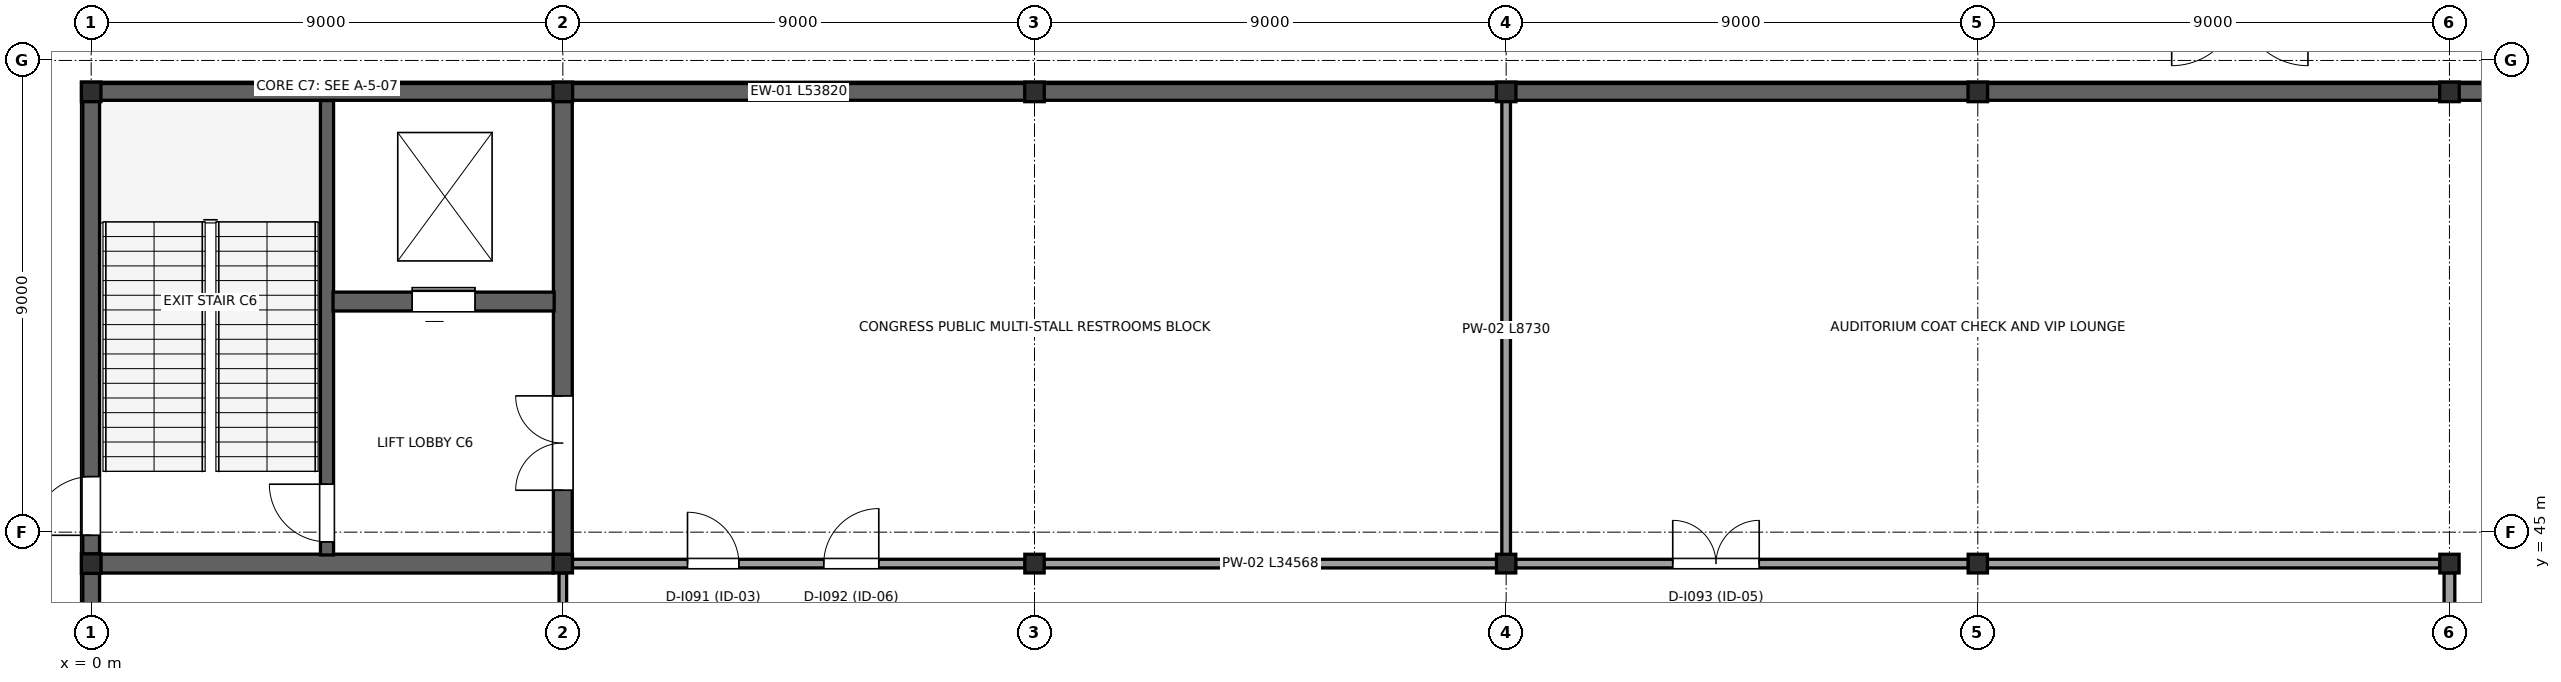
"""IFC4 building model, lengths in metres.
Left out: names, types, materials, properties, quantities, classifications, styles, units other than length and angle.
Written with IfcOpenShell. Run it as: python <this file> out.ifc"""

import sys

from ifc_helpers import new_model, si_unit, direction, frame, frame_2d, origin, origin_2d, place, context, subcontext, project, spatial, rectangle, i_section, extrude, element, fill, save


model = new_model("IFC4")
c1 = context("Model", 3, precision=1e-05, world=origin(), true_north=direction((0.0, 1.0)))
c2 = subcontext(c1, "Body", "Model", "MODEL_VIEW")
j1 = project(units=[si_unit("LENGTHUNIT", "METRE"), si_unit("PLANEANGLEUNIT", "RADIAN")], contexts=[c1])
p1 = place(None, origin())
s1 = spatial("IfcSite", under=j1, at=p1, CompositionType="ELEMENT")
p2 = place(p1, origin())
s2 = spatial("IfcBuilding", under=s1, at=p2, CompositionType="ELEMENT")
p3 = place(p2, origin())
s3 = spatial("IfcBuildingStorey", under=s2, at=p3, CompositionType="ELEMENT", Elevation=0.0)
for number, where, z_axis, x_axis in (
    (1, (45.0, 53.4, 0.0), (0.0, 0.0, 1.0), (1.0, 0.0, 0.0)),
    (2, (36.0, 53.4, 0.0), (0.0, 0.0, 1.0), (1.0, 0.0, 0.0)),
    (3, (27.0, 53.4, 0.0), (0.0, 0.0, 1.0), (1.0, 0.0, 0.0)),
    (4, (18.0, 53.4, 0.0), (0.0, 0.0, 1.0), (1.0, 0.0, 0.0)),
    (5, (9.0, 53.4, 0.0), (0.0, 0.0, 1.0), (1.0, 0.0, 0.0)),
    (6, (0.0, 53.4, 0.0), (0.0, 0.0, 1.0), (1.0, 0.0, 0.0)),
    (7, (0.0, 44.4, 0.0), (0.0, 0.0, 1.0), (1.0, 0.0, 0.0)),
):
    element("IfcColumn", number, at=place(p3, frame(where, z_axis=z_axis, x_axis=x_axis)), inside=s3, PredefinedType="COLUMN", context=c2, shape_type="SweptSolid", body=[
        extrude(i_section(OverallWidth=0.373, OverallDepth=0.373, WebThickness=0.016, FlangeThickness=0.026, at=origin_2d()), origin(), (0.0, 0.0, 1.0), 6.0),
    ])
for number, where, z_axis, x_axis in (
    (8, (9.0, 44.4, 0.0), (0.0, 0.0, 1.0), (1.0, 0.0, 0.0)),
    (9, (18.0, 44.4, 0.0), (0.0, 0.0, 1.0), (1.0, 0.0, 0.0)),
    (10, (27.0, 44.4, 0.0), (0.0, 0.0, 1.0), (1.0, 0.0, 0.0)),
    (11, (36.0, 44.4, 0.0), (0.0, 0.0, 1.0), (1.0, 0.0, 0.0)),
    (12, (45.0, 44.4, 0.0), (0.0, 0.0, 1.0), (1.0, 0.0, 0.0)),
):
    element("IfcColumn", number, at=place(p3, frame(where, z_axis=z_axis, x_axis=x_axis)), inside=s3, PredefinedType="COLUMN", context=c2, shape_type="SweptSolid", body=[
        extrude(i_section(OverallWidth=0.368, OverallDepth=0.356, WebThickness=0.011, FlangeThickness=0.018, at=origin_2d()), origin(), (0.0, 0.0, 1.0), 6.0),
    ])
p4 = place(p3, frame((0.0, 36.18, 0.0), z_axis=(0.0, 0.0, 1.0), x_axis=(0.0, 1.0, 0.0)))
e13 = element("IfcWall", 13, at=p4, inside=s3, PredefinedType="STANDARD", context=c2, shape_type="SweptSolid", body=[
    extrude(rectangle(XDim=8.04, YDim=0.32, at=frame_2d((4.02, 0.0))), origin(), (0.0, 0.0, 1.0), 5.78),
])
p5 = place(p3, frame((0.0, 44.58, 0.0), z_axis=(0.0, 0.0, 1.0), x_axis=(0.0, 1.0, 0.0)))
e14 = element("IfcWall", 14, at=p5, inside=s3, PredefinedType="STANDARD", context=c2, shape_type="SweptSolid", body=[
    extrude(rectangle(XDim=8.64, YDim=0.32, at=frame_2d((4.32, 0.0))), origin(), (0.0, 0.0, 1.0), 5.78),
])
p6 = place(p5, frame((0.36, 0.0, 0.0)))
e15 = element("IfcOpeningElement", 15, at=p6, cuts=e14, PredefinedType="OPENING", context=c2, shape_type="SweptSolid", body=[
    extrude(rectangle(XDim=1.12, YDim=2.24, at=frame_2d((0.56, 1.12))), frame((0.0, 0.17, 0.0), z_axis=(0.0, -1.0, 0.0), x_axis=(1.0, 0.0, 0.0)), (0.0, 0.0, 1.0), 0.34),
])
for number, where, z_axis, x_axis in (
    (16, (0.015, 53.4, 0.0), (0.0, 0.0, 1.0), (1.0, 0.0, 0.0)),
    (17, (9.015, 53.4, 0.0), (0.0, 0.0, 1.0), (1.0, 0.0, 0.0)),
    (18, (18.015, 53.4, 0.0), (0.0, 0.0, 1.0), (1.0, 0.0, 0.0)),
    (19, (27.015, 53.4, 0.0), (0.0, 0.0, 1.0), (1.0, 0.0, 0.0)),
    (20, (36.015, 53.4, 0.0), (0.0, 0.0, 1.0), (1.0, 0.0, 0.0)),
):
    element("IfcWall", number, at=place(p3, frame(where, z_axis=z_axis, x_axis=x_axis)), inside=s3, PredefinedType="STANDARD", context=c2, shape_type="SweptSolid", body=[
        extrude(rectangle(XDim=8.97, YDim=0.32, at=frame_2d((4.485, 0.0))), origin(), (0.0, 0.0, 1.0), 5.78),
    ])
p7 = place(p3, frame((45.015, 53.4, 0.0), z_axis=(0.0, 0.0, 1.0), x_axis=(1.0, 0.0, 0.0)))
e21 = element("IfcWall", 21, at=p7, inside=s3, PredefinedType="STANDARD", context=c2, shape_type="SweptSolid", body=[
    extrude(rectangle(XDim=8.97, YDim=0.32, at=frame_2d((4.485, 0.0))), origin(), (0.0, 0.0, 1.0), 6.0),
])
p8 = place(p3, frame((9.0, 44.573, 0.0), z_axis=(0.0, 0.0, 1.0), x_axis=(0.0, 1.0, 0.0)))
e22 = element("IfcWall", 22, at=p8, inside=s3, PredefinedType="SHEAR", context=c2, shape_type="SweptSolid", body=[
    extrude(rectangle(XDim=8.646, YDim=0.36, at=frame_2d((4.323, 0.0))), origin(), (0.0, 0.0, 1.0), 5.78),
])
p9 = place(p8, frame((1.227, 0.0, 0.0)))
e23 = element("IfcOpeningElement", 23, at=p9, cuts=e22, PredefinedType="OPENING", context=c2, shape_type="SweptSolid", body=[
    extrude(rectangle(XDim=1.8, YDim=2.3, at=frame_2d((0.9, 1.15))), frame((0.0, 0.19, 0.0), z_axis=(0.0, -1.0, 0.0), x_axis=(1.0, 0.0, 0.0)), (0.0, 0.0, 1.0), 0.38),
])
p10 = place(p3, frame((0.181, 44.4, 0.0), z_axis=(0.0, 0.0, 1.0), x_axis=(1.0, 0.0, 0.0)))
e24 = element("IfcWall", 24, at=p10, inside=s3, PredefinedType="SHEAR", context=c2, shape_type="SweptSolid", body=[
    extrude(rectangle(XDim=8.64, YDim=0.36, at=frame_2d((4.32, 0.0))), origin(), (0.0, 0.0, 1.0), 5.78),
])
p11 = place(p3, frame((4.5, 44.565, 0.0), z_axis=(0.0, 0.0, 1.0), x_axis=(0.0, 1.0, 0.0)))
e25 = element("IfcWall", 25, at=p11, inside=s3, PredefinedType="SHEAR", context=c2, shape_type="SweptSolid", body=[
    extrude(rectangle(XDim=8.67, YDim=0.25, at=frame_2d((4.335, 0.0))), origin(), (0.0, 0.0, 1.0), 5.78),
])
p12 = place(p11, frame((0.25, 0.0, 0.0)))
e26 = element("IfcOpeningElement", 26, at=p12, cuts=e25, PredefinedType="OPENING", context=c2, shape_type="SweptSolid", body=[
    extrude(rectangle(XDim=1.1, YDim=2.2, at=frame_2d((0.55, 1.1))), frame((0.0, 0.135, 0.0), z_axis=(0.0, -1.0, 0.0), x_axis=(1.0, 0.0, 0.0)), (0.0, 0.0, 1.0), 0.27),
])
p13 = place(p3, frame((4.615, 49.4, 0.0), z_axis=(0.0, 0.0, 1.0), x_axis=(1.0, 0.0, 0.0)))
e27 = element("IfcWall", 27, at=p13, inside=s3, PredefinedType="SHEAR", context=c2, shape_type="SweptSolid", body=[
    extrude(rectangle(XDim=4.22, YDim=0.36, at=frame_2d((2.11, 0.0))), origin(), (0.0, 0.0, 1.0), 5.78),
])
p14 = place(p13, frame((1.51, 0.0, 0.0)))
e28 = element("IfcOpeningElement", 28, at=p14, cuts=e27, PredefinedType="OPENING", context=c2, shape_type="SweptSolid", body=[
    extrude(rectangle(XDim=1.2, YDim=2.3, at=frame_2d((0.6, 1.15))), frame((0.0, 0.19, 0.0), z_axis=(0.0, -1.0, 0.0), x_axis=(1.0, 0.0, 0.0)), (0.0, 0.0, 1.0), 0.38),
])
p15 = place(p3, frame((45.0, 36.0, 0.0), z_axis=(0.0, 0.0, 1.0), x_axis=(0.0, 1.0, 0.0)))
e29 = element("IfcWall", 29, at=p15, inside=s3, PredefinedType="PARTITIONING", context=c2, shape_type="SweptSolid", body=[
    extrude(rectangle(XDim=8.227, YDim=0.205, at=frame_2d((4.114, 0.0))), origin(), (0.0, 0.0, 1.0), 4.65),
])
p16 = place(p15, frame((3.288, 0.0, 0.0)))
e30 = element("IfcOpeningElement", 30, at=p16, cuts=e29, PredefinedType="OPENING", context=c2, shape_type="SweptSolid", body=[
    extrude(rectangle(XDim=1.65, YDim=2.25, at=frame_2d((0.825, 1.125))), frame((0.0, 0.113, 0.0), z_axis=(0.0, -1.0, 0.0), x_axis=(1.0, 0.0, 0.0)), (0.0, 0.0, 1.0), 0.225),
])
p17 = place(p3, frame((9.0, 36.15, 0.0), z_axis=(0.0, 0.0, 1.0), x_axis=(0.0, 1.0, 0.0)))
e31 = element("IfcWall", 31, at=p17, inside=s3, PredefinedType="PARTITIONING", context=c2, shape_type="SweptSolid", body=[
    extrude(rectangle(XDim=8.07, YDim=0.145, at=frame_2d((4.035, 0.0))), origin(), (0.0, 0.0, 1.0), 4.65),
])
p18 = place(p17, frame((3.0, 0.0, 0.0)))
e32 = element("IfcOpeningElement", 32, at=p18, cuts=e31, PredefinedType="OPENING", context=c2, shape_type="SweptSolid", body=[
    extrude(rectangle(XDim=0.92, YDim=2.1, at=frame_2d((0.46, 1.05))), frame((0.0, 0.083, 0.0), z_axis=(0.0, -1.0, 0.0), x_axis=(1.0, 0.0, 0.0)), (0.0, 0.0, 1.0), 0.165),
])
p19 = place(p3, frame((9.179, 44.4, 0.0), z_axis=(0.0, 0.0, 1.0), x_axis=(1.0, 0.0, 0.0)))
e33 = element("IfcWall", 33, at=p19, inside=s3, PredefinedType="PARTITIONING", context=c2, shape_type="SweptSolid", body=[
    extrude(rectangle(XDim=8.642, YDim=0.165, at=frame_2d((4.321, 0.0))), origin(), (0.0, 0.0, 1.0), 4.65),
])
p20 = place(p19, frame((2.2, 0.0, 0.0)))
e34 = element("IfcOpeningElement", 34, at=p20, cuts=e33, PredefinedType="OPENING", context=c2, shape_type="SweptSolid", body=[
    extrude(rectangle(XDim=0.98, YDim=2.15, at=frame_2d((0.49, 1.075))), frame((0.0, 0.093, 0.0), z_axis=(0.0, -1.0, 0.0), x_axis=(1.0, 0.0, 0.0)), (0.0, 0.0, 1.0), 0.185),
])
p21 = place(p19, frame((4.8, 0.0, 0.0)))
e35 = element("IfcOpeningElement", 35, at=p21, cuts=e33, PredefinedType="OPENING", context=c2, shape_type="SweptSolid", body=[
    extrude(rectangle(XDim=1.05, YDim=2.18, at=frame_2d((0.525, 1.09))), frame((0.0, 0.093, 0.0), z_axis=(0.0, -1.0, 0.0), x_axis=(1.0, 0.0, 0.0)), (0.0, 0.0, 1.0), 0.185),
])
p22 = place(p3, frame((18.179, 44.4, 0.0), z_axis=(0.0, 0.0, 1.0), x_axis=(1.0, 0.0, 0.0)))
e36 = element("IfcWall", 36, at=p22, inside=s3, PredefinedType="PARTITIONING", context=c2, shape_type="SweptSolid", body=[
    extrude(rectangle(XDim=8.642, YDim=0.165, at=frame_2d((4.321, 0.0))), origin(), (0.0, 0.0, 1.0), 4.65),
])
p23 = place(p3, frame((27.179, 44.4, 0.0), z_axis=(0.0, 0.0, 1.0), x_axis=(1.0, 0.0, 0.0)))
e37 = element("IfcWall", 37, at=p23, inside=s3, PredefinedType="PARTITIONING", context=c2, shape_type="SweptSolid", body=[
    extrude(rectangle(XDim=8.642, YDim=0.165, at=frame_2d((4.321, 0.0))), origin(), (0.0, 0.0, 1.0), 4.65),
])
p24 = place(p23, frame((3.0, 0.0, 0.0)))
e38 = element("IfcOpeningElement", 38, at=p24, cuts=e37, PredefinedType="OPENING", context=c2, shape_type="SweptSolid", body=[
    extrude(rectangle(XDim=1.65, YDim=2.25, at=frame_2d((0.825, 1.125))), frame((0.0, 0.093, 0.0), z_axis=(0.0, -1.0, 0.0), x_axis=(1.0, 0.0, 0.0)), (0.0, 0.0, 1.0), 0.185),
])
p25 = place(p3, frame((36.179, 44.4, 0.0), z_axis=(0.0, 0.0, 1.0), x_axis=(1.0, 0.0, 0.0)))
e39 = element("IfcWall", 39, at=p25, inside=s3, PredefinedType="PARTITIONING", context=c2, shape_type="SweptSolid", body=[
    extrude(rectangle(XDim=8.642, YDim=0.165, at=frame_2d((4.321, 0.0))), origin(), (0.0, 0.0, 1.0), 4.65),
])
p26 = place(p3, frame((27.0, 44.5, 0.0), z_axis=(0.0, 0.0, 1.0), x_axis=(0.0, 1.0, 0.0)))
e40 = element("IfcWall", 40, at=p26, inside=s3, PredefinedType="PARTITIONING", context=c2, shape_type="SweptSolid", body=[
    extrude(rectangle(XDim=8.73, YDim=0.165, at=frame_2d((4.365, 0.0))), origin(), (0.0, 0.0, 1.0), 4.65),
])
p27 = place(p6, origin())
e41 = element("IfcDoor", 41, at=p27, inside=s3, OperationType="SINGLE_SWING_LEFT", PredefinedType="DOOR", context=c2, shape_type="SweptSolid", body=[
    extrude(rectangle(XDim=1.12, YDim=2.24, at=frame_2d((0.56, 1.12))), frame((0.0, 0.025, 0.0), z_axis=(0.0, -1.0, 0.0), x_axis=(1.0, 0.0, 0.0)), (0.0, 0.0, 1.0), 0.05),
])
fill(e15, e41)
p28 = place(p12, origin())
e42 = element("IfcDoor", 42, at=p28, inside=s3, OperationType="SINGLE_SWING_RIGHT", PredefinedType="DOOR", context=c2, shape_type="SweptSolid", body=[
    extrude(rectangle(XDim=1.1, YDim=2.2, at=frame_2d((0.55, 1.1))), frame((0.0, 0.025, 0.0), z_axis=(0.0, -1.0, 0.0), x_axis=(1.0, 0.0, 0.0)), (0.0, 0.0, 1.0), 0.05),
])
fill(e26, e42)
p29 = place(p14, origin())
e43 = element("IfcDoor", 43, at=p29, inside=s3, OperationType="SLIDING_TO_LEFT", PredefinedType="DOOR", context=c2, shape_type="SweptSolid", body=[
    extrude(rectangle(XDim=1.2, YDim=2.3, at=frame_2d((0.6, 1.15))), frame((0.0, 0.025, 0.0), z_axis=(0.0, -1.0, 0.0), x_axis=(1.0, 0.0, 0.0)), (0.0, 0.0, 1.0), 0.05),
])
fill(e28, e43)
p30 = place(p9, origin())
e44 = element("IfcDoor", 44, at=p30, inside=s3, OperationType="DOUBLE_DOOR_SINGLE_SWING", PredefinedType="DOOR", context=c2, shape_type="SweptSolid", body=[
    extrude(rectangle(XDim=1.8, YDim=2.3, at=frame_2d((0.9, 1.15))), frame((0.0, 0.025, 0.0), z_axis=(0.0, -1.0, 0.0), x_axis=(1.0, 0.0, 0.0)), (0.0, 0.0, 1.0), 0.05),
])
fill(e23, e44)
p31 = place(p20, origin())
e45 = element("IfcDoor", 45, at=p31, inside=s3, OperationType="SINGLE_SWING_LEFT", PredefinedType="DOOR", context=c2, shape_type="SweptSolid", body=[
    extrude(rectangle(XDim=0.98, YDim=2.15, at=frame_2d((0.49, 1.075))), frame((0.0, 0.025, 0.0), z_axis=(0.0, -1.0, 0.0), x_axis=(1.0, 0.0, 0.0)), (0.0, 0.0, 1.0), 0.05),
])
fill(e34, e45)
p32 = place(p21, origin())
e46 = element("IfcDoor", 46, at=p32, inside=s3, OperationType="SINGLE_SWING_RIGHT", PredefinedType="DOOR", context=c2, shape_type="SweptSolid", body=[
    extrude(rectangle(XDim=1.05, YDim=2.18, at=frame_2d((0.525, 1.09))), frame((0.0, 0.025, 0.0), z_axis=(0.0, -1.0, 0.0), x_axis=(1.0, 0.0, 0.0)), (0.0, 0.0, 1.0), 0.05),
])
fill(e35, e46)
p33 = place(p24, origin())
e47 = element("IfcDoor", 47, at=p33, inside=s3, OperationType="DOUBLE_DOOR_SINGLE_SWING", PredefinedType="DOOR", context=c2, shape_type="SweptSolid", body=[
    extrude(rectangle(XDim=1.65, YDim=2.25, at=frame_2d((0.825, 1.125))), frame((0.0, 0.025, 0.0), z_axis=(0.0, -1.0, 0.0), x_axis=(1.0, 0.0, 0.0)), (0.0, 0.0, 1.0), 0.05),
])
fill(e38, e47)
save(model, sys.argv[1])
